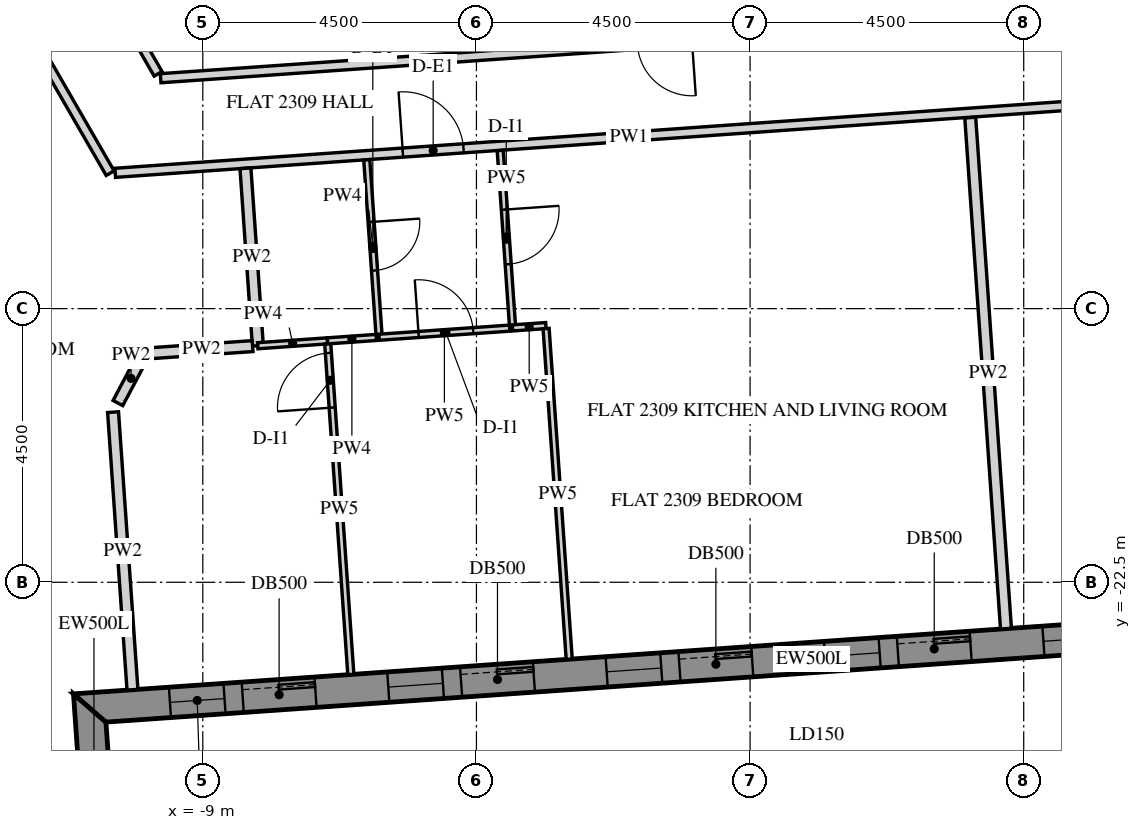
"""IFC4 building model, lengths in metres.
Left out: names, types, materials, properties, quantities, classifications, styles, units other than length and angle.
Written with IfcOpenShell. Run it as: python <this file> out.ifc"""

import sys

from ifc_helpers import new_model, si_unit, direction, frame, frame_2d, origin, place, context, subcontext, project, spatial, polyline, rectangle, outline, extrude, element, fill, save


model = new_model("IFC4")
c1 = context("Model", 3, precision=1e-05, world=origin(), true_north=direction((0.0, 1.0)))
c2 = subcontext(c1, "Body", "Model", "MODEL_VIEW")
j1 = project(units=[si_unit("LENGTHUNIT", "METRE"), si_unit("PLANEANGLEUNIT", "RADIAN")], contexts=[c1])
p1 = place(None, origin())
s1 = spatial("IfcSite", under=j1, at=p1, CompositionType="ELEMENT")
p2 = place(p1, origin())
s2 = spatial("IfcBuilding", under=s1, at=p2, CompositionType="ELEMENT")
p3 = place(p2, frame((0.0, 0.0, 291.3)))
s3 = spatial("IfcBuildingStorey", under=s2, at=p3, CompositionType="ELEMENT", Elevation=291.3)
p4 = place(p3, frame((-10.72, -26.562, -0.15), z_axis=(0.0, 0.0, 1.0), x_axis=(-0.069824268692, 0.99755930726, 0.0)))
e1 = element("IfcWall", 1, at=p4, inside=s3, PredefinedType="SOLIDWALL", context=c2, shape_type="SweptSolid", body=[
    extrude(outline(polyline([(-0.25, -0.25), (1.75, -0.25), (2.25, 0.25), (0.25, 0.25), (-0.25, -0.25)])), origin(), (0.0, 0.0, 1.0), 3.9),
])
p5 = place(p3, frame((-10.86, -24.567, -0.15), z_axis=(0.0, 0.0, 1.0), x_axis=(0.997564329317, 0.06975248292, 0.0)))
e2 = element("IfcWall", 2, at=p5, inside=s3, PredefinedType="SOLIDWALL", context=c2, shape_type="SweptSolid", body=[
    extrude(outline(polyline([(0.25, -0.25), (22.795, -0.25), (23.295, 0.25), (-0.25, 0.25), (0.25, -0.25)])), origin(), (0.0, 0.0, 1.0), 3.9),
])
p6 = place(p5, frame((1.323, 0.0, 1.05)))
e3 = element("IfcOpeningElement", 3, at=p6, cuts=e2, PredefinedType="OPENING", context=c2, shape_type="SweptSolid", body=[
    extrude(rectangle(XDim=0.9, YDim=1.5, at=frame_2d((0.45, 0.75))), frame((0.0, 0.26, 0.0), z_axis=(0.0, -1.0, 0.0), x_axis=(1.0, 0.0, 0.0)), (0.0, 0.0, 1.0), 0.52),
])
p7 = place(p5, frame((2.522, 0.0, 0.15)))
e4 = element("IfcOpeningElement", 4, at=p7, cuts=e2, PredefinedType="OPENING", context=c2, shape_type="SweptSolid", body=[
    extrude(rectangle(XDim=1.2, YDim=2.4, at=frame_2d((0.6, 1.2))), frame((0.0, 0.26, 0.0), z_axis=(0.0, -1.0, 0.0), x_axis=(1.0, 0.0, 0.0)), (0.0, 0.0, 1.0), 0.52),
])
p8 = place(p5, frame((4.922, 0.0, 1.05)))
e5 = element("IfcOpeningElement", 5, at=p8, cuts=e2, PredefinedType="OPENING", context=c2, shape_type="SweptSolid", body=[
    extrude(rectangle(XDim=0.9, YDim=1.5, at=frame_2d((0.45, 0.75))), frame((0.0, 0.26, 0.0), z_axis=(0.0, -1.0, 0.0), x_axis=(1.0, 0.0, 0.0)), (0.0, 0.0, 1.0), 0.52),
])
p9 = place(p5, frame((6.122, 0.0, 0.15)))
e6 = element("IfcOpeningElement", 6, at=p9, cuts=e2, PredefinedType="OPENING", context=c2, shape_type="SweptSolid", body=[
    extrude(rectangle(XDim=1.2, YDim=2.4, at=frame_2d((0.6, 1.2))), frame((0.0, 0.26, 0.0), z_axis=(0.0, -1.0, 0.0), x_axis=(1.0, 0.0, 0.0)), (0.0, 0.0, 1.0), 0.52),
])
p10 = place(p5, frame((8.522, 0.0, 1.05)))
e7 = element("IfcOpeningElement", 7, at=p10, cuts=e2, PredefinedType="OPENING", context=c2, shape_type="SweptSolid", body=[
    extrude(rectangle(XDim=0.9, YDim=1.5, at=frame_2d((0.45, 0.75))), frame((0.0, 0.26, 0.0), z_axis=(0.0, -1.0, 0.0), x_axis=(1.0, 0.0, 0.0)), (0.0, 0.0, 1.0), 0.52),
])
p11 = place(p5, frame((9.722, 0.0, 0.15)))
e8 = element("IfcOpeningElement", 8, at=p11, cuts=e2, PredefinedType="OPENING", context=c2, shape_type="SweptSolid", body=[
    extrude(rectangle(XDim=1.2, YDim=2.4, at=frame_2d((0.6, 1.2))), frame((0.0, 0.26, 0.0), z_axis=(0.0, -1.0, 0.0), x_axis=(1.0, 0.0, 0.0)), (0.0, 0.0, 1.0), 0.52),
])
p12 = place(p5, frame((12.122, 0.0, 1.05)))
e9 = element("IfcOpeningElement", 9, at=p12, cuts=e2, PredefinedType="OPENING", context=c2, shape_type="SweptSolid", body=[
    extrude(rectangle(XDim=0.9, YDim=1.5, at=frame_2d((0.45, 0.75))), frame((0.0, 0.26, 0.0), z_axis=(0.0, -1.0, 0.0), x_axis=(1.0, 0.0, 0.0)), (0.0, 0.0, 1.0), 0.52),
])
p13 = place(p5, frame((13.323, 0.0, 0.15)))
e10 = element("IfcOpeningElement", 10, at=p13, cuts=e2, PredefinedType="OPENING", context=c2, shape_type="SweptSolid", body=[
    extrude(rectangle(XDim=1.2, YDim=2.4, at=frame_2d((0.6, 1.2))), frame((0.0, 0.26, 0.0), z_axis=(0.0, -1.0, 0.0), x_axis=(1.0, 0.0, 0.0)), (0.0, 0.0, 1.0), 0.52),
])
p14 = place(p5, frame((15.722, 0.0, 1.05)))
e11 = element("IfcOpeningElement", 11, at=p14, cuts=e2, PredefinedType="OPENING", context=c2, shape_type="SweptSolid", body=[
    extrude(rectangle(XDim=0.9, YDim=1.5, at=frame_2d((0.45, 0.75))), frame((0.0, 0.26, 0.0), z_axis=(0.0, -1.0, 0.0), x_axis=(1.0, 0.0, 0.0)), (0.0, 0.0, 1.0), 0.52),
])
p15 = place(p5, frame((16.922, 0.0, 0.15)))
e12 = element("IfcOpeningElement", 12, at=p15, cuts=e2, PredefinedType="OPENING", context=c2, shape_type="SweptSolid", body=[
    extrude(rectangle(XDim=1.2, YDim=2.4, at=frame_2d((0.6, 1.2))), frame((0.0, 0.26, 0.0), z_axis=(0.0, -1.0, 0.0), x_axis=(1.0, 0.0, 0.0)), (0.0, 0.0, 1.0), 0.52),
])
p16 = place(p5, frame((19.323, 0.0, 1.05)))
e13 = element("IfcOpeningElement", 13, at=p16, cuts=e2, PredefinedType="OPENING", context=c2, shape_type="SweptSolid", body=[
    extrude(rectangle(XDim=0.9, YDim=1.5, at=frame_2d((0.45, 0.75))), frame((0.0, 0.26, 0.0), z_axis=(0.0, -1.0, 0.0), x_axis=(1.0, 0.0, 0.0)), (0.0, 0.0, 1.0), 0.52),
])
p17 = place(p5, frame((20.522, 0.0, 0.15)))
e14 = element("IfcOpeningElement", 14, at=p17, cuts=e2, PredefinedType="OPENING", context=c2, shape_type="SweptSolid", body=[
    extrude(rectangle(XDim=1.2, YDim=2.4, at=frame_2d((0.6, 1.2))), frame((0.0, 0.26, 0.0), z_axis=(0.0, -1.0, 0.0), x_axis=(1.0, 0.0, 0.0)), (0.0, 0.0, 1.0), 0.52),
])
p18 = place(p3, frame((-17.998, -2.826, 0.0), z_axis=(0.0, 0.0, 1.0), x_axis=(0.500003306199, -0.866023494941, 0.0)))
e15 = element("IfcWall", 15, at=p18, inside=s3, PredefinedType="PARTITIONING", context=c2, shape_type="SweptSolid", body=[
    extrude(rectangle(XDim=14.949, YDim=0.15, at=frame_2d((7.475, 0.0))), origin(), (0.0, 0.0, 1.0), 2.988),
])
p19 = place(p18, frame((2.725, 0.0, 0.0)))
e16 = element("IfcOpeningElement", 16, at=p19, cuts=e15, PredefinedType="OPENING", context=c2, shape_type="SweptSolid", body=[
    extrude(rectangle(XDim=1.0, YDim=2.1, at=frame_2d((0.5, 1.05))), frame((0.0, 0.085, 0.0), z_axis=(0.0, -1.0, 0.0), x_axis=(1.0, 0.0, 0.0)), (0.0, 0.0, 1.0), 0.17),
])
p20 = place(p18, frame((8.576, 0.0, 0.0)))
e17 = element("IfcOpeningElement", 17, at=p20, cuts=e15, PredefinedType="OPENING", context=c2, shape_type="SweptSolid", body=[
    extrude(rectangle(XDim=1.0, YDim=2.1, at=frame_2d((0.5, 1.05))), frame((0.0, 0.085, 0.0), z_axis=(0.0, -1.0, 0.0), x_axis=(1.0, 0.0, 0.0)), (0.0, 0.0, 1.0), 0.17),
])
p21 = place(p3, frame((-10.44, -15.767, 0.0), z_axis=(0.0, 0.0, 1.0), x_axis=(0.997534721961, 0.070174628483, 0.0)))
e18 = element("IfcWall", 18, at=p21, inside=s3, PredefinedType="PARTITIONING", context=c2, shape_type="SweptSolid", body=[
    extrude(rectangle(XDim=16.939, YDim=0.15, at=frame_2d((8.47, 0.0))), origin(), (0.0, 0.0, 1.0), 2.988),
])
p22 = place(p21, frame((4.742, 0.0, 0.0)))
e19 = element("IfcOpeningElement", 19, at=p22, cuts=e18, PredefinedType="OPENING", context=c2, shape_type="SweptSolid", body=[
    extrude(rectangle(XDim=1.0, YDim=2.1, at=frame_2d((0.5, 1.05))), frame((0.0, 0.085, 0.0), z_axis=(0.0, -1.0, 0.0), x_axis=(1.0, 0.0, 0.0)), (0.0, 0.0, 1.0), 0.17),
])
p23 = place(p3, frame((6.884, -13.052, 0.0), z_axis=(0.0, 0.0, 1.0), x_axis=(-0.997564224443, -0.069753982764, 0.0)))
e20 = element("IfcWall", 20, at=p23, inside=s3, PredefinedType="PARTITIONING", context=c2, shape_type="SweptSolid", body=[
    extrude(rectangle(XDim=16.618, YDim=0.15, at=frame_2d((8.309, 0.0))), origin(), (0.0, 0.0, 1.0), 2.988),
])
p24 = place(p23, frame((7.859, 0.0, 0.0)))
e21 = element("IfcOpeningElement", 21, at=p24, cuts=e20, PredefinedType="OPENING", context=c2, shape_type="SweptSolid", body=[
    extrude(rectangle(XDim=0.9, YDim=2.1, at=frame_2d((0.45, 1.05))), frame((0.0, 0.085, 0.0), z_axis=(0.0, -1.0, 0.0), x_axis=(1.0, 0.0, 0.0)), (0.0, 0.0, 1.0), 0.17),
])
p25 = place(p3, frame((-9.735, -14.138, 0.0), z_axis=(0.0, 0.0, 1.0), x_axis=(-0.500018385592, 0.866014788598, 0.0)))
e22 = element("IfcWall", 22, at=p25, inside=s3, PredefinedType="PARTITIONING", context=c2, shape_type="SweptSolid", body=[
    extrude(rectangle(XDim=6.356, YDim=0.15, at=frame_2d((3.178, 0.0))), origin(), (0.0, 0.0, 1.0), 2.988),
])
p26 = place(p3, frame((-8.094, -18.61, 0.0), z_axis=(0.0, 0.0, 1.0), x_axis=(-0.069781781132, 0.997562280272, 0.0)))
e23 = element("IfcWall", 23, at=p26, inside=s3, PredefinedType="PARTITIONING", context=c2, shape_type="SweptSolid", body=[
    extrude(rectangle(XDim=2.925, YDim=0.18, at=frame_2d((1.462, 0.0))), origin(), (0.0, 0.0, 1.0), 2.988),
])
p27 = place(p3, frame((-10.157, -24.268, 0.0), z_axis=(0.0, 0.0, 1.0), x_axis=(-0.069722955951, 0.997566393486, 0.0)))
e24 = element("IfcWall", 24, at=p27, inside=s3, PredefinedType="PARTITIONING", context=c2, shape_type="SweptSolid", body=[
    extrude(rectangle(XDim=4.577, YDim=0.18, at=frame_2d((2.288, 0.0))), origin(), (0.0, 0.0, 1.0), 2.988),
])
p28 = place(p3, frame((-10.396, -19.552, 0.0), z_axis=(0.0, 0.0, 1.0), x_axis=(0.469595353143, 0.882881761226, 0.0)))
e25 = element("IfcWall", 25, at=p28, inside=s3, PredefinedType="PARTITIONING", context=c2, shape_type="SweptSolid", body=[
    extrude(rectangle(XDim=0.919, YDim=0.18, at=frame_2d((0.459, 0.0))), origin(), (0.0, 0.0, 1.0), 2.988),
])
p29 = place(p3, frame((-9.859, -18.733, 0.0), z_axis=(0.0, 0.0, 1.0), x_axis=(0.997559371599, 0.069823349496, 0.0)))
e26 = element("IfcWall", 26, at=p29, inside=s3, PredefinedType="PARTITIONING", context=c2, shape_type="SweptSolid", body=[
    extrude(rectangle(XDim=1.682, YDim=0.18, at=frame_2d((0.841, 0.0))), origin(), (0.0, 0.0, 1.0), 2.988),
])
p30 = place(p3, frame((-4.109, -15.399, 0.0), z_axis=(0.0, 0.0, 1.0), x_axis=(0.069781781132, -0.997562280272, 0.0)))
e27 = element("IfcWall", 27, at=p30, inside=s3, PredefinedType="PARTITIONING", context=c2, shape_type="SweptSolid", body=[
    extrude(rectangle(XDim=2.925, YDim=0.1, at=frame_2d((1.462, 0.0))), origin(), (0.0, 0.0, 1.0), 2.988),
])
p31 = place(p30, frame((0.975, 0.0, 0.0)))
e28 = element("IfcOpeningElement", 28, at=p31, cuts=e27, PredefinedType="OPENING", context=c2, shape_type="SweptSolid", body=[
    extrude(rectangle(XDim=0.9, YDim=2.1, at=frame_2d((0.45, 1.05))), frame((0.0, 0.06, 0.0), z_axis=(0.0, -1.0, 0.0), x_axis=(1.0, 0.0, 0.0)), (0.0, 0.0, 1.0), 0.12),
])
p32 = place(p3, frame((-3.907, -18.317, 0.0), z_axis=(0.0, 0.0, 1.0), x_axis=(0.997570082671, 0.069670152571, 0.0)))
e29 = element("IfcWall", 29, at=p32, inside=s3, PredefinedType="PARTITIONING", context=c2, shape_type="SweptSolid", body=[
    extrude(rectangle(XDim=0.55, YDim=0.1, at=frame_2d((0.275, 0.0))), origin(), (0.0, 0.0, 1.0), 2.988),
])
p33 = place(p3, frame((-3.354, -18.329, 0.0), z_axis=(0.0, 0.0, 1.0), x_axis=(0.069747550305, -0.997564674207, 0.0)))
e30 = element("IfcWall", 30, at=p33, inside=s3, PredefinedType="PARTITIONING", context=c2, shape_type="SweptSolid", body=[
    extrude(rectangle(XDim=5.45, YDim=0.1, at=frame_2d((2.725, 0.0))), origin(), (0.0, 0.0, 1.0), 2.988),
])
p34 = place(p3, frame((4.208, -23.263, 0.0), z_axis=(0.0, 0.0, 1.0), x_axis=(-0.069749826803, 0.997564515037, 0.0)))
e31 = element("IfcWall", 31, at=p34, inside=s3, PredefinedType="PARTITIONING", context=c2, shape_type="SweptSolid", body=[
    extrude(rectangle(XDim=8.425, YDim=0.18, at=frame_2d((4.212, 0.0))), origin(), (0.0, 0.0, 1.0), 2.988),
])
p35 = place(p3, frame((-6.303, -15.552, 0.0), z_axis=(0.0, 0.0, 1.0), x_axis=(0.069775971057, -0.997562686683, 0.0)))
e32 = element("IfcWall", 32, at=p35, inside=s3, PredefinedType="PARTITIONING", context=c2, shape_type="SweptSolid", body=[
    extrude(rectangle(XDim=2.925, YDim=0.1, at=frame_2d((1.462, 0.0))), origin(), (0.0, 0.0, 1.0), 2.988),
])
p36 = place(p35, frame((1.025, 0.0, 0.0)))
e33 = element("IfcOpeningElement", 33, at=p36, cuts=e32, PredefinedType="OPENING", context=c2, shape_type="SweptSolid", body=[
    extrude(rectangle(XDim=0.8, YDim=2.1, at=frame_2d((0.4, 1.05))), frame((0.0, 0.06, 0.0), z_axis=(0.0, -1.0, 0.0), x_axis=(1.0, 0.0, 0.0)), (0.0, 0.0, 1.0), 0.12),
])
p37 = place(p3, frame((-6.102, -18.471, 0.0), z_axis=(0.0, 0.0, 1.0), x_axis=(0.997560072268, 0.069813338391, 0.0)))
e34 = element("IfcWall", 34, at=p37, inside=s3, PredefinedType="PARTITIONING", context=c2, shape_type="SweptSolid", body=[
    extrude(rectangle(XDim=2.154, YDim=0.1, at=frame_2d((1.077, 0.0))), origin(), (0.0, 0.0, 1.0), 2.988),
])
p38 = place(p37, frame((0.652, 0.0, 0.0)))
e35 = element("IfcOpeningElement", 35, at=p38, cuts=e34, PredefinedType="OPENING", context=c2, shape_type="SweptSolid", body=[
    extrude(rectangle(XDim=0.9, YDim=2.1, at=frame_2d((0.45, 1.05))), frame((0.0, 0.06, 0.0), z_axis=(0.0, -1.0, 0.0), x_axis=(1.0, 0.0, 0.0)), (0.0, 0.0, 1.0), 0.12),
])
p39 = place(p3, frame((-8.097, -18.61, 0.0), z_axis=(0.0, 0.0, 1.0), x_axis=(0.99756000175, 0.069814346006, 0.0)))
e36 = element("IfcWall", 36, at=p39, inside=s3, PredefinedType="PARTITIONING", context=c2, shape_type="SweptSolid", body=[
    extrude(rectangle(XDim=1.15, YDim=0.1, at=frame_2d((0.575, 0.0))), origin(), (0.0, 0.0, 1.0), 2.988),
])
p40 = place(p3, frame((-6.949, -18.53, 0.0), z_axis=(0.0, 0.0, 1.0), x_axis=(0.997577552604, 0.06956311192, 0.0)))
e37 = element("IfcWall", 37, at=p40, inside=s3, PredefinedType="PARTITIONING", context=c2, shape_type="SweptSolid", body=[
    extrude(rectangle(XDim=0.804, YDim=0.1, at=frame_2d((0.402, 0.0))), origin(), (0.0, 0.0, 1.0), 2.988),
])
p41 = place(p3, frame((-6.565, -24.017, 0.0), z_axis=(0.0, 0.0, 1.0), x_axis=(-0.069747550305, 0.997564674207, 0.0)))
e38 = element("IfcWall", 38, at=p41, inside=s3, PredefinedType="PARTITIONING", context=c2, shape_type="SweptSolid", body=[
    extrude(rectangle(XDim=5.45, YDim=0.1, at=frame_2d((2.725, 0.0))), origin(), (0.0, 0.0, 1.0), 2.988),
])
p42 = place(p41, frame((4.4, 0.0, 0.0)))
e39 = element("IfcOpeningElement", 39, at=p42, cuts=e38, PredefinedType="OPENING", context=c2, shape_type="SweptSolid", body=[
    extrude(rectangle(XDim=0.9, YDim=2.1, at=frame_2d((0.45, 1.05))), frame((0.0, 0.06, 0.0), z_axis=(0.0, -1.0, 0.0), x_axis=(1.0, 0.0, 0.0)), (0.0, 0.0, 1.0), 0.12),
])
p43 = place(p6, frame((0.0, 0.18, 0.0)))
e40 = element("IfcWindow", 40, at=p43, inside=s3, PartitioningType="SINGLE_PANEL", PredefinedType="WINDOW", context=c2, shape_type="SweptSolid", body=[
    extrude(rectangle(XDim=0.9, YDim=1.5, at=frame_2d((0.45, 0.75))), frame((0.0, 0.03, 0.0), z_axis=(0.0, -1.0, 0.0), x_axis=(1.0, 0.0, 0.0)), (0.0, 0.0, 1.0), 0.06),
])
fill(e3, e40)
p44 = place(p7, frame((0.0, 0.175, 0.0)))
e41 = element("IfcDoor", 41, at=p44, inside=s3, OperationType="SLIDING_TO_LEFT", PredefinedType="DOOR", context=c2, shape_type="SweptSolid", body=[
    extrude(rectangle(XDim=1.2, YDim=2.4, at=frame_2d((0.6, 1.2))), frame((0.0, 0.025, 0.0), z_axis=(0.0, -1.0, 0.0), x_axis=(1.0, 0.0, 0.0)), (0.0, 0.0, 1.0), 0.05),
])
fill(e4, e41)
p45 = place(p8, frame((0.0, 0.18, 0.0)))
e42 = element("IfcWindow", 42, at=p45, inside=s3, PartitioningType="SINGLE_PANEL", PredefinedType="WINDOW", context=c2, shape_type="SweptSolid", body=[
    extrude(rectangle(XDim=0.9, YDim=1.5, at=frame_2d((0.45, 0.75))), frame((0.0, 0.03, 0.0), z_axis=(0.0, -1.0, 0.0), x_axis=(1.0, 0.0, 0.0)), (0.0, 0.0, 1.0), 0.06),
])
fill(e5, e42)
p46 = place(p9, frame((0.0, 0.175, 0.0)))
e43 = element("IfcDoor", 43, at=p46, inside=s3, OperationType="SLIDING_TO_LEFT", PredefinedType="DOOR", context=c2, shape_type="SweptSolid", body=[
    extrude(rectangle(XDim=1.2, YDim=2.4, at=frame_2d((0.6, 1.2))), frame((0.0, 0.025, 0.0), z_axis=(0.0, -1.0, 0.0), x_axis=(1.0, 0.0, 0.0)), (0.0, 0.0, 1.0), 0.05),
])
fill(e6, e43)
p47 = place(p10, frame((0.0, 0.18, 0.0)))
e44 = element("IfcWindow", 44, at=p47, inside=s3, PartitioningType="SINGLE_PANEL", PredefinedType="WINDOW", context=c2, shape_type="SweptSolid", body=[
    extrude(rectangle(XDim=0.9, YDim=1.5, at=frame_2d((0.45, 0.75))), frame((0.0, 0.03, 0.0), z_axis=(0.0, -1.0, 0.0), x_axis=(1.0, 0.0, 0.0)), (0.0, 0.0, 1.0), 0.06),
])
fill(e7, e44)
p48 = place(p11, frame((0.0, 0.175, 0.0)))
e45 = element("IfcDoor", 45, at=p48, inside=s3, OperationType="SLIDING_TO_LEFT", PredefinedType="DOOR", context=c2, shape_type="SweptSolid", body=[
    extrude(rectangle(XDim=1.2, YDim=2.4, at=frame_2d((0.6, 1.2))), frame((0.0, 0.025, 0.0), z_axis=(0.0, -1.0, 0.0), x_axis=(1.0, 0.0, 0.0)), (0.0, 0.0, 1.0), 0.05),
])
fill(e8, e45)
p49 = place(p12, frame((0.0, 0.18, 0.0)))
e46 = element("IfcWindow", 46, at=p49, inside=s3, PartitioningType="SINGLE_PANEL", PredefinedType="WINDOW", context=c2, shape_type="SweptSolid", body=[
    extrude(rectangle(XDim=0.9, YDim=1.5, at=frame_2d((0.45, 0.75))), frame((0.0, 0.03, 0.0), z_axis=(0.0, -1.0, 0.0), x_axis=(1.0, 0.0, 0.0)), (0.0, 0.0, 1.0), 0.06),
])
fill(e9, e46)
p50 = place(p13, frame((0.0, 0.175, 0.0)))
e47 = element("IfcDoor", 47, at=p50, inside=s3, OperationType="SLIDING_TO_LEFT", PredefinedType="DOOR", context=c2, shape_type="SweptSolid", body=[
    extrude(rectangle(XDim=1.2, YDim=2.4, at=frame_2d((0.6, 1.2))), frame((0.0, 0.025, 0.0), z_axis=(0.0, -1.0, 0.0), x_axis=(1.0, 0.0, 0.0)), (0.0, 0.0, 1.0), 0.05),
])
fill(e10, e47)
p51 = place(p14, frame((0.0, 0.18, 0.0)))
e48 = element("IfcWindow", 48, at=p51, inside=s3, PartitioningType="SINGLE_PANEL", PredefinedType="WINDOW", context=c2, shape_type="SweptSolid", body=[
    extrude(rectangle(XDim=0.9, YDim=1.5, at=frame_2d((0.45, 0.75))), frame((0.0, 0.03, 0.0), z_axis=(0.0, -1.0, 0.0), x_axis=(1.0, 0.0, 0.0)), (0.0, 0.0, 1.0), 0.06),
])
fill(e11, e48)
p52 = place(p22, origin())
e49 = element("IfcDoor", 49, at=p52, inside=s3, OperationType="SINGLE_SWING_LEFT", PredefinedType="DOOR", context=c2, shape_type="SweptSolid", body=[
    extrude(rectangle(XDim=1.0, YDim=2.1, at=frame_2d((0.5, 1.05))), frame((0.0, 0.025, 0.0), z_axis=(0.0, -1.0, 0.0), x_axis=(1.0, 0.0, 0.0)), (0.0, 0.0, 1.0), 0.05),
])
fill(e19, e49)
p53 = place(p36, origin())
e50 = element("IfcDoor", 50, at=p53, inside=s3, OperationType="SINGLE_SWING_RIGHT", PredefinedType="DOOR", context=c2, shape_type="SweptSolid", body=[
    extrude(rectangle(XDim=0.8, YDim=2.1, at=frame_2d((0.4, 1.05))), frame((0.0, 0.025, 0.0), z_axis=(0.0, -1.0, 0.0), x_axis=(1.0, 0.0, 0.0)), (0.0, 0.0, 1.0), 0.05),
])
fill(e33, e50)
p54 = place(p31, origin())
e51 = element("IfcDoor", 51, at=p54, inside=s3, OperationType="SINGLE_SWING_RIGHT", PredefinedType="DOOR", context=c2, shape_type="SweptSolid", body=[
    extrude(rectangle(XDim=0.9, YDim=2.1, at=frame_2d((0.45, 1.05))), frame((0.0, 0.025, 0.0), z_axis=(0.0, -1.0, 0.0), x_axis=(1.0, 0.0, 0.0)), (0.0, 0.0, 1.0), 0.05),
])
fill(e28, e51)
p55 = place(p42, origin())
e52 = element("IfcDoor", 52, at=p55, inside=s3, OperationType="SINGLE_SWING_RIGHT", PredefinedType="DOOR", context=c2, shape_type="SweptSolid", body=[
    extrude(rectangle(XDim=0.9, YDim=2.1, at=frame_2d((0.45, 1.05))), frame((0.0, 0.025, 0.0), z_axis=(0.0, -1.0, 0.0), x_axis=(1.0, 0.0, 0.0)), (0.0, 0.0, 1.0), 0.05),
])
fill(e39, e52)
p56 = place(p38, origin())
e53 = element("IfcDoor", 53, at=p56, inside=s3, OperationType="SINGLE_SWING_RIGHT", PredefinedType="DOOR", context=c2, shape_type="SweptSolid", body=[
    extrude(rectangle(XDim=0.9, YDim=2.1, at=frame_2d((0.45, 1.05))), frame((0.0, 0.025, 0.0), z_axis=(0.0, -1.0, 0.0), x_axis=(1.0, 0.0, 0.0)), (0.0, 0.0, 1.0), 0.05),
])
fill(e35, e53)
save(model, sys.argv[1])
